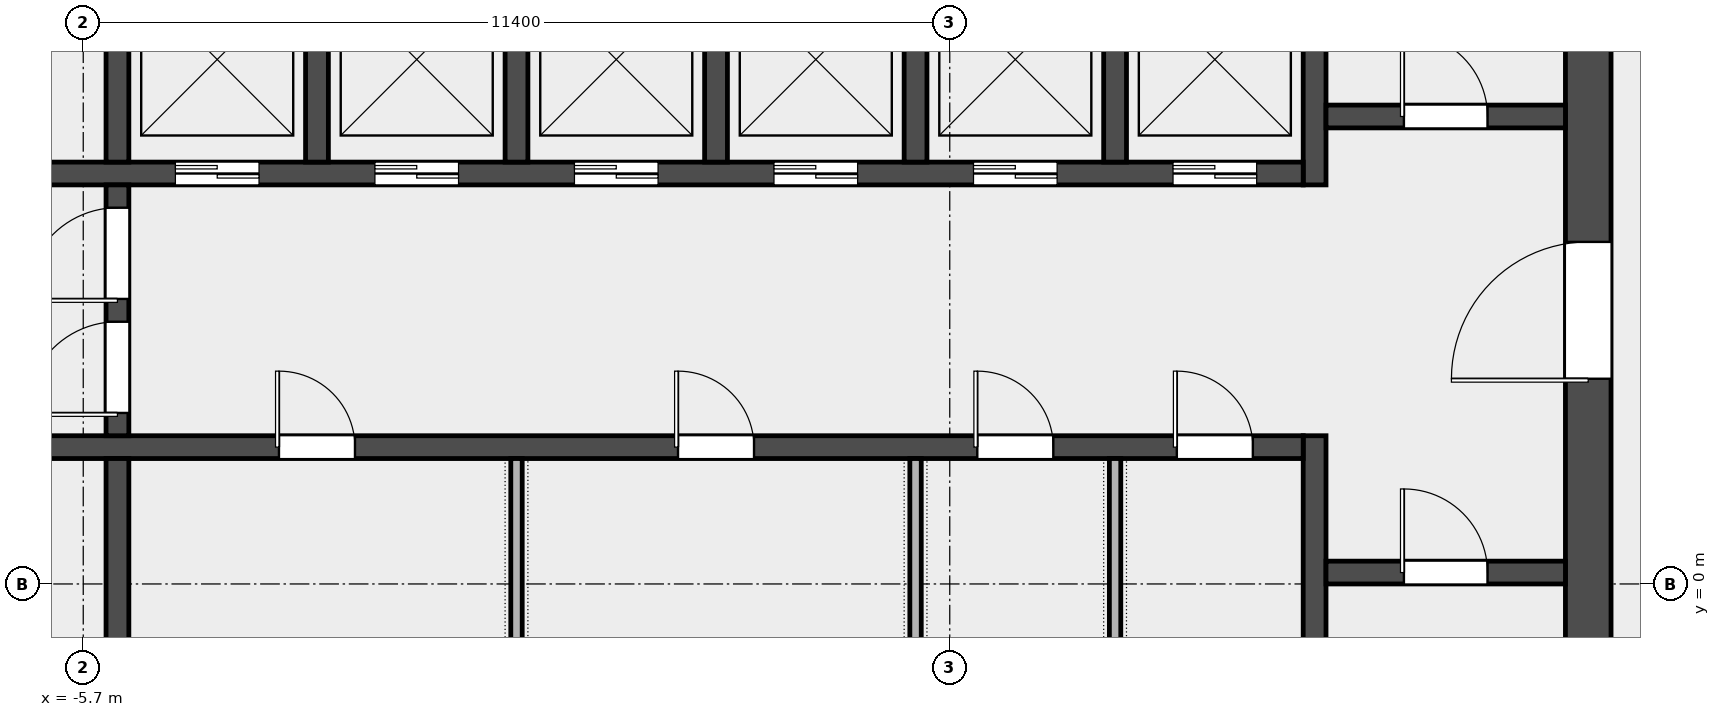
"""IFC4 building model, lengths in metres.
Left out: names, types, materials, properties, quantities, classifications, styles, units other than length and angle.
Written with IfcOpenShell. Run it as: python <this file> out.ifc"""

import sys

from ifc_helpers import new_model, si_unit, direction, frame, frame_2d, origin, place, context, subcontext, project, spatial, rectangle, extrude, element, fill, save


model = new_model("IFC4")
c1 = context("Model", 3, precision=1e-05, world=origin(), true_north=direction((0.0, 1.0)))
c2 = subcontext(c1, "Body", "Model", "MODEL_VIEW")
j1 = project(units=[si_unit("LENGTHUNIT", "METRE"), si_unit("PLANEANGLEUNIT", "RADIAN")], contexts=[c1])
p1 = place(None, origin())
s1 = spatial("IfcSite", under=j1, at=p1, CompositionType="ELEMENT")
p2 = place(p1, origin())
s2 = spatial("IfcBuilding", under=s1, at=p2, CompositionType="ELEMENT")
p3 = place(p2, frame((0.0, 0.0, 215.0)))
s3 = spatial("IfcBuildingStorey", under=s2, at=p3, CompositionType="ELEMENT", Elevation=215.0)
p4 = place(p3, frame((14.1, -6.6, 0.0), z_axis=(0.0, 0.0, 1.0), x_axis=(0.0, 1.0, 0.0)))
e1 = element("IfcWall", 1, at=p4, inside=s3, PredefinedType="SHEAR", context=c2, shape_type="SweptSolid", body=[
    extrude(rectangle(XDim=19.5, YDim=0.6, at=frame_2d((9.75, 0.0))), origin(), (0.0, 0.0, 1.0), 3.7),
])
p5 = place(p4, frame((9.3, 0.0, 0.0)))
e2 = element("IfcOpeningElement", 2, at=p5, cuts=e1, PredefinedType="OPENING", context=c2, shape_type="SweptSolid", body=[
    extrude(rectangle(XDim=1.8, YDim=2.1, at=frame_2d((0.9, 1.05))), frame((0.0, 0.312, 0.0), z_axis=(0.0, -1.0, 0.0), x_axis=(1.0, 0.0, 0.0)), (0.0, 0.0, 1.0), 0.624),
])
p6 = place(p3, frame((10.5, -6.6, 0.0), z_axis=(0.0, 0.0, 1.0), x_axis=(0.0, 1.0, 0.0)))
e3 = element("IfcWall", 3, at=p6, inside=s3, PredefinedType="SHEAR", context=c2, shape_type="SweptSolid", body=[
    extrude(rectangle(XDim=8.55, YDim=0.3, at=frame_2d((4.275, 0.0))), origin(), (0.0, 0.0, 1.0), 3.7),
])
p7 = place(p3, frame((10.5, 5.25, 0.0), z_axis=(0.0, 0.0, 1.0), x_axis=(0.0, 1.0, 0.0)))
e4 = element("IfcWall", 4, at=p7, inside=s3, PredefinedType="SHEAR", context=c2, shape_type="SweptSolid", body=[
    extrude(rectangle(XDim=7.65, YDim=0.3, at=frame_2d((3.825, 0.0))), origin(), (0.0, 0.0, 1.0), 3.7),
])
p8 = place(p3, frame((10.65, 0.15, 0.0), z_axis=(0.0, 0.0, 1.0), x_axis=(1.0, 0.0, 0.0)))
e5 = element("IfcWall", 5, at=p8, inside=s3, PredefinedType="SOLIDWALL", context=c2, shape_type="SweptSolid", body=[
    extrude(rectangle(XDim=3.15, YDim=0.3, at=frame_2d((1.575, 0.0))), origin(), (0.0, 0.0, 1.0), 3.7),
])
p9 = place(p8, frame((1.025, 0.0, 0.0)))
e6 = element("IfcOpeningElement", 6, at=p9, cuts=e5, PredefinedType="OPENING", context=c2, shape_type="SweptSolid", body=[
    extrude(rectangle(XDim=1.1, YDim=2.1, at=frame_2d((0.55, 1.05))), frame((0.0, 0.162, 0.0), z_axis=(0.0, -1.0, 0.0), x_axis=(1.0, 0.0, 0.0)), (0.0, 0.0, 1.0), 0.324),
])
p10 = place(p3, frame((10.65, 6.15, 0.0), z_axis=(0.0, 0.0, 1.0), x_axis=(1.0, 0.0, 0.0)))
e7 = element("IfcWall", 7, at=p10, inside=s3, PredefinedType="SOLIDWALL", context=c2, shape_type="SweptSolid", body=[
    extrude(rectangle(XDim=3.15, YDim=0.3, at=frame_2d((1.575, 0.0))), origin(), (0.0, 0.0, 1.0), 3.7),
])
p11 = place(p10, frame((1.025, 0.0, 0.0)))
e8 = element("IfcOpeningElement", 8, at=p11, cuts=e7, PredefinedType="OPENING", context=c2, shape_type="SweptSolid", body=[
    extrude(rectangle(XDim=1.1, YDim=2.1, at=frame_2d((0.55, 1.05))), frame((0.0, 0.162, 0.0), z_axis=(0.0, -1.0, 0.0), x_axis=(1.0, 0.0, 0.0)), (0.0, 0.0, 1.0), 0.324),
])
p12 = place(p3, frame((-10.35, 1.8, 0.0), z_axis=(0.0, 0.0, 1.0), x_axis=(1.0, 0.0, 0.0)))
e9 = element("IfcWall", 9, at=p12, inside=s3, PredefinedType="SOLIDWALL", context=c2, shape_type="SweptSolid", body=[
    extrude(rectangle(XDim=20.7, YDim=0.3, at=frame_2d((10.35, 0.0))), origin(), (0.0, 0.0, 1.0), 3.7),
])
p13 = place(p12, frame((0.512, 0.0, 0.0)))
e10 = element("IfcOpeningElement", 10, at=p13, cuts=e9, PredefinedType="OPENING", context=c2, shape_type="SweptSolid", body=[
    extrude(rectangle(XDim=1.3, YDim=2.1, at=frame_2d((0.65, 1.05))), frame((0.0, 0.162, 0.0), z_axis=(0.0, -1.0, 0.0), x_axis=(1.0, 0.0, 0.0)), (0.0, 0.0, 1.0), 0.324),
])
p14 = place(p12, frame((7.225, 0.0, 0.0)))
e11 = element("IfcOpeningElement", 11, at=p14, cuts=e9, PredefinedType="OPENING", context=c2, shape_type="SweptSolid", body=[
    extrude(rectangle(XDim=1.0, YDim=2.1, at=frame_2d((0.5, 1.05))), frame((0.0, 0.162, 0.0), z_axis=(0.0, -1.0, 0.0), x_axis=(1.0, 0.0, 0.0)), (0.0, 0.0, 1.0), 0.324),
])
p15 = place(p12, frame((12.475, 0.0, 0.0)))
e12 = element("IfcOpeningElement", 12, at=p15, cuts=e9, PredefinedType="OPENING", context=c2, shape_type="SweptSolid", body=[
    extrude(rectangle(XDim=1.0, YDim=2.1, at=frame_2d((0.5, 1.05))), frame((0.0, 0.162, 0.0), z_axis=(0.0, -1.0, 0.0), x_axis=(1.0, 0.0, 0.0)), (0.0, 0.0, 1.0), 0.324),
])
p16 = place(p12, frame((16.413, 0.0, 0.0)))
e13 = element("IfcOpeningElement", 13, at=p16, cuts=e9, PredefinedType="OPENING", context=c2, shape_type="SweptSolid", body=[
    extrude(rectangle(XDim=1.0, YDim=2.1, at=frame_2d((0.5, 1.05))), frame((0.0, 0.162, 0.0), z_axis=(0.0, -1.0, 0.0), x_axis=(1.0, 0.0, 0.0)), (0.0, 0.0, 1.0), 0.324),
])
p17 = place(p12, frame((19.038, 0.0, 0.0)))
e14 = element("IfcOpeningElement", 14, at=p17, cuts=e9, PredefinedType="OPENING", context=c2, shape_type="SweptSolid", body=[
    extrude(rectangle(XDim=1.0, YDim=2.1, at=frame_2d((0.5, 1.05))), frame((0.0, 0.162, 0.0), z_axis=(0.0, -1.0, 0.0), x_axis=(1.0, 0.0, 0.0)), (0.0, 0.0, 1.0), 0.324),
])
p18 = place(p3, frame((-10.35, 5.4, 0.0), z_axis=(0.0, 0.0, 1.0), x_axis=(1.0, 0.0, 0.0)))
e15 = element("IfcWall", 15, at=p18, inside=s3, PredefinedType="SOLIDWALL", context=c2, shape_type="SweptSolid", body=[
    extrude(rectangle(XDim=20.7, YDim=0.3, at=frame_2d((10.35, 0.0))), origin(), (0.0, 0.0, 1.0), 3.7),
])
p19 = place(p18, frame((0.512, 0.0, 0.0)))
e16 = element("IfcOpeningElement", 16, at=p19, cuts=e15, PredefinedType="OPENING", context=c2, shape_type="SweptSolid", body=[
    extrude(rectangle(XDim=1.3, YDim=2.1, at=frame_2d((0.65, 1.05))), frame((0.0, 0.162, 0.0), z_axis=(0.0, -1.0, 0.0), x_axis=(1.0, 0.0, 0.0)), (0.0, 0.0, 1.0), 0.324),
])
p20 = place(p18, frame((5.863, 0.0, 0.0)))
e17 = element("IfcOpeningElement", 17, at=p20, cuts=e15, PredefinedType="OPENING", context=c2, shape_type="SweptSolid", body=[
    extrude(rectangle(XDim=1.1, YDim=2.1, at=frame_2d((0.55, 1.05))), frame((0.0, 0.162, 0.0), z_axis=(0.0, -1.0, 0.0), x_axis=(1.0, 0.0, 0.0)), (0.0, 0.0, 1.0), 0.324),
])
p21 = place(p18, frame((8.488, 0.0, 0.0)))
e18 = element("IfcOpeningElement", 18, at=p21, cuts=e15, PredefinedType="OPENING", context=c2, shape_type="SweptSolid", body=[
    extrude(rectangle(XDim=1.1, YDim=2.1, at=frame_2d((0.55, 1.05))), frame((0.0, 0.162, 0.0), z_axis=(0.0, -1.0, 0.0), x_axis=(1.0, 0.0, 0.0)), (0.0, 0.0, 1.0), 0.324),
])
p22 = place(p18, frame((11.113, 0.0, 0.0)))
e19 = element("IfcOpeningElement", 19, at=p22, cuts=e15, PredefinedType="OPENING", context=c2, shape_type="SweptSolid", body=[
    extrude(rectangle(XDim=1.1, YDim=2.1, at=frame_2d((0.55, 1.05))), frame((0.0, 0.162, 0.0), z_axis=(0.0, -1.0, 0.0), x_axis=(1.0, 0.0, 0.0)), (0.0, 0.0, 1.0), 0.324),
])
p23 = place(p18, frame((13.738, 0.0, 0.0)))
e20 = element("IfcOpeningElement", 20, at=p23, cuts=e15, PredefinedType="OPENING", context=c2, shape_type="SweptSolid", body=[
    extrude(rectangle(XDim=1.1, YDim=2.1, at=frame_2d((0.55, 1.05))), frame((0.0, 0.162, 0.0), z_axis=(0.0, -1.0, 0.0), x_axis=(1.0, 0.0, 0.0)), (0.0, 0.0, 1.0), 0.324),
])
p24 = place(p18, frame((16.363, 0.0, 0.0)))
e21 = element("IfcOpeningElement", 21, at=p24, cuts=e15, PredefinedType="OPENING", context=c2, shape_type="SweptSolid", body=[
    extrude(rectangle(XDim=1.1, YDim=2.1, at=frame_2d((0.55, 1.05))), frame((0.0, 0.162, 0.0), z_axis=(0.0, -1.0, 0.0), x_axis=(1.0, 0.0, 0.0)), (0.0, 0.0, 1.0), 0.324),
])
p25 = place(p18, frame((18.988, 0.0, 0.0)))
e22 = element("IfcOpeningElement", 22, at=p25, cuts=e15, PredefinedType="OPENING", context=c2, shape_type="SweptSolid", body=[
    extrude(rectangle(XDim=1.1, YDim=2.1, at=frame_2d((0.55, 1.05))), frame((0.0, 0.162, 0.0), z_axis=(0.0, -1.0, 0.0), x_axis=(1.0, 0.0, 0.0)), (0.0, 0.0, 1.0), 0.324),
])
for number, where, z_axis, x_axis in (
    (23, (-5.25, -1.05, 0.0), (0.0, 0.0, 1.0), (0.0, 1.0, 0.0)),
    (24, (-5.25, 5.55, 0.0), (0.0, 0.0, 1.0), (0.0, 1.0, 0.0)),
    (25, (-2.625, 5.55, 0.0), (0.0, 0.0, 1.0), (0.0, 1.0, 0.0)),
    (26, (0.0, 5.55, 0.0), (0.0, 0.0, 1.0), (0.0, 1.0, 0.0)),
    (27, (2.625, 5.55, 0.0), (0.0, 0.0, 1.0), (0.0, 1.0, 0.0)),
    (28, (5.25, 5.55, 0.0), (0.0, 0.0, 1.0), (0.0, 1.0, 0.0)),
    (29, (7.875, 5.55, 0.0), (0.0, 0.0, 1.0), (0.0, 1.0, 0.0)),
):
    element("IfcWall", number, at=place(p3, frame(where, z_axis=z_axis, x_axis=x_axis)), inside=s3, PredefinedType="SOLIDWALL", context=c2, shape_type="SweptSolid", body=[
        extrude(rectangle(XDim=2.7, YDim=0.3, at=frame_2d((1.35, 0.0))), origin(), (0.0, 0.0, 1.0), 3.7),
    ])
p26 = place(p3, frame((-5.25, 1.95, 0.0), z_axis=(0.0, 0.0, 1.0), x_axis=(0.0, 1.0, 0.0)))
e30 = element("IfcWall", 30, at=p26, inside=s3, PredefinedType="SOLIDWALL", context=c2, shape_type="SweptSolid", body=[
    extrude(rectangle(XDim=3.3, YDim=0.3, at=frame_2d((1.65, 0.0))), origin(), (0.0, 0.0, 1.0), 3.7),
])
p27 = place(p26, frame((0.3, 0.0, 0.0)))
e31 = element("IfcOpeningElement", 31, at=p27, cuts=e30, PredefinedType="OPENING", context=c2, shape_type="SweptSolid", body=[
    extrude(rectangle(XDim=1.2, YDim=2.1, at=frame_2d((0.6, 1.05))), frame((0.0, 0.162, 0.0), z_axis=(0.0, -1.0, 0.0), x_axis=(1.0, 0.0, 0.0)), (0.0, 0.0, 1.0), 0.324),
])
p28 = place(p26, frame((1.8, 0.0, 0.0)))
e32 = element("IfcOpeningElement", 32, at=p28, cuts=e30, PredefinedType="OPENING", context=c2, shape_type="SweptSolid", body=[
    extrude(rectangle(XDim=1.2, YDim=2.1, at=frame_2d((0.6, 1.05))), frame((0.0, 0.162, 0.0), z_axis=(0.0, -1.0, 0.0), x_axis=(1.0, 0.0, 0.0)), (0.0, 0.0, 1.0), 0.324),
])
for number, where, z_axis, x_axis in (
    (33, (0.0, -1.05, 0.0), (0.0, 0.0, 1.0), (0.0, 1.0, 0.0)),
    (34, (5.25, -1.05, 0.0), (0.0, 0.0, 1.0), (0.0, 1.0, 0.0)),
    (35, (7.875, -1.05, 0.0), (0.0, 0.0, 1.0), (0.0, 1.0, 0.0)),
):
    element("IfcWall", number, at=place(p3, frame(where, z_axis=z_axis, x_axis=x_axis)), inside=s3, PredefinedType="PARTITIONING", context=c2, shape_type="SweptSolid", body=[
        extrude(rectangle(XDim=2.7, YDim=0.15, at=frame_2d((1.35, 0.0))), origin(), (0.0, 0.0, 1.0), 3.7),
    ])
p29 = place(p9, origin())
e36 = element("IfcDoor", 36, at=p29, inside=s3, OperationType="SINGLE_SWING_RIGHT", PredefinedType="DOOR", context=c2, shape_type="SweptSolid", body=[
    extrude(rectangle(XDim=1.1, YDim=2.1, at=frame_2d((0.55, 1.05))), frame((0.0, 0.025, 0.0), z_axis=(0.0, -1.0, 0.0), x_axis=(1.0, 0.0, 0.0)), (0.0, 0.0, 1.0), 0.05),
])
fill(e6, e36)
p30 = place(p11, origin())
e37 = element("IfcDoor", 37, at=p30, inside=s3, OperationType="SINGLE_SWING_RIGHT", PredefinedType="DOOR", context=c2, shape_type="SweptSolid", body=[
    extrude(rectangle(XDim=1.1, YDim=2.1, at=frame_2d((0.55, 1.05))), frame((0.0, 0.025, 0.0), z_axis=(0.0, -1.0, 0.0), x_axis=(1.0, 0.0, 0.0)), (0.0, 0.0, 1.0), 0.05),
])
fill(e8, e37)
p31 = place(p5, origin())
e38 = element("IfcDoor", 38, at=p31, inside=s3, OperationType="DOUBLE_DOOR_SINGLE_SWING", PredefinedType="DOOR", context=c2, shape_type="SweptSolid", body=[
    extrude(rectangle(XDim=1.8, YDim=2.1, at=frame_2d((0.9, 1.05))), frame((0.0, 0.025, 0.0), z_axis=(0.0, -1.0, 0.0), x_axis=(1.0, 0.0, 0.0)), (0.0, 0.0, 1.0), 0.05),
])
fill(e2, e38)
p32 = place(p27, origin())
e39 = element("IfcDoor", 39, at=p32, inside=s3, OperationType="SINGLE_SWING_LEFT", PredefinedType="DOOR", context=c2, shape_type="SweptSolid", body=[
    extrude(rectangle(XDim=1.2, YDim=2.1, at=frame_2d((0.6, 1.05))), frame((0.0, 0.025, 0.0), z_axis=(0.0, -1.0, 0.0), x_axis=(1.0, 0.0, 0.0)), (0.0, 0.0, 1.0), 0.05),
])
fill(e31, e39)
p33 = place(p28, origin())
e40 = element("IfcDoor", 40, at=p33, inside=s3, OperationType="SINGLE_SWING_RIGHT", PredefinedType="DOOR", context=c2, shape_type="SweptSolid", body=[
    extrude(rectangle(XDim=1.2, YDim=2.1, at=frame_2d((0.6, 1.05))), frame((0.0, 0.025, 0.0), z_axis=(0.0, -1.0, 0.0), x_axis=(1.0, 0.0, 0.0)), (0.0, 0.0, 1.0), 0.05),
])
fill(e32, e40)
p34 = place(p20, origin())
e41 = element("IfcDoor", 41, at=p34, inside=s3, OperationType="DOUBLE_DOOR_SLIDING", PredefinedType="DOOR", context=c2, shape_type="SweptSolid", body=[
    extrude(rectangle(XDim=1.1, YDim=2.1, at=frame_2d((0.55, 1.05))), frame((0.0, 0.025, 0.0), z_axis=(0.0, -1.0, 0.0), x_axis=(1.0, 0.0, 0.0)), (0.0, 0.0, 1.0), 0.05),
])
fill(e17, e41)
p35 = place(p21, origin())
e42 = element("IfcDoor", 42, at=p35, inside=s3, OperationType="DOUBLE_DOOR_SLIDING", PredefinedType="DOOR", context=c2, shape_type="SweptSolid", body=[
    extrude(rectangle(XDim=1.1, YDim=2.1, at=frame_2d((0.55, 1.05))), frame((0.0, 0.025, 0.0), z_axis=(0.0, -1.0, 0.0), x_axis=(1.0, 0.0, 0.0)), (0.0, 0.0, 1.0), 0.05),
])
fill(e18, e42)
p36 = place(p22, origin())
e43 = element("IfcDoor", 43, at=p36, inside=s3, OperationType="DOUBLE_DOOR_SLIDING", PredefinedType="DOOR", context=c2, shape_type="SweptSolid", body=[
    extrude(rectangle(XDim=1.1, YDim=2.1, at=frame_2d((0.55, 1.05))), frame((0.0, 0.025, 0.0), z_axis=(0.0, -1.0, 0.0), x_axis=(1.0, 0.0, 0.0)), (0.0, 0.0, 1.0), 0.05),
])
fill(e19, e43)
p37 = place(p23, origin())
e44 = element("IfcDoor", 44, at=p37, inside=s3, OperationType="DOUBLE_DOOR_SLIDING", PredefinedType="DOOR", context=c2, shape_type="SweptSolid", body=[
    extrude(rectangle(XDim=1.1, YDim=2.1, at=frame_2d((0.55, 1.05))), frame((0.0, 0.025, 0.0), z_axis=(0.0, -1.0, 0.0), x_axis=(1.0, 0.0, 0.0)), (0.0, 0.0, 1.0), 0.05),
])
fill(e20, e44)
p38 = place(p24, origin())
e45 = element("IfcDoor", 45, at=p38, inside=s3, OperationType="DOUBLE_DOOR_SLIDING", PredefinedType="DOOR", context=c2, shape_type="SweptSolid", body=[
    extrude(rectangle(XDim=1.1, YDim=2.1, at=frame_2d((0.55, 1.05))), frame((0.0, 0.025, 0.0), z_axis=(0.0, -1.0, 0.0), x_axis=(1.0, 0.0, 0.0)), (0.0, 0.0, 1.0), 0.05),
])
fill(e21, e45)
p39 = place(p25, origin())
e46 = element("IfcDoor", 46, at=p39, inside=s3, OperationType="DOUBLE_DOOR_SLIDING", PredefinedType="DOOR", context=c2, shape_type="SweptSolid", body=[
    extrude(rectangle(XDim=1.1, YDim=2.1, at=frame_2d((0.55, 1.05))), frame((0.0, 0.025, 0.0), z_axis=(0.0, -1.0, 0.0), x_axis=(1.0, 0.0, 0.0)), (0.0, 0.0, 1.0), 0.05),
])
fill(e22, e46)
p40 = place(p14, origin())
e47 = element("IfcDoor", 47, at=p40, inside=s3, OperationType="SINGLE_SWING_LEFT", PredefinedType="DOOR", context=c2, shape_type="SweptSolid", body=[
    extrude(rectangle(XDim=1.0, YDim=2.1, at=frame_2d((0.5, 1.05))), frame((0.0, 0.025, 0.0), z_axis=(0.0, -1.0, 0.0), x_axis=(1.0, 0.0, 0.0)), (0.0, 0.0, 1.0), 0.05),
])
fill(e11, e47)
p41 = place(p15, origin())
e48 = element("IfcDoor", 48, at=p41, inside=s3, OperationType="SINGLE_SWING_LEFT", PredefinedType="DOOR", context=c2, shape_type="SweptSolid", body=[
    extrude(rectangle(XDim=1.0, YDim=2.1, at=frame_2d((0.5, 1.05))), frame((0.0, 0.025, 0.0), z_axis=(0.0, -1.0, 0.0), x_axis=(1.0, 0.0, 0.0)), (0.0, 0.0, 1.0), 0.05),
])
fill(e12, e48)
p42 = place(p16, origin())
e49 = element("IfcDoor", 49, at=p42, inside=s3, OperationType="SINGLE_SWING_LEFT", PredefinedType="DOOR", context=c2, shape_type="SweptSolid", body=[
    extrude(rectangle(XDim=1.0, YDim=2.1, at=frame_2d((0.5, 1.05))), frame((0.0, 0.025, 0.0), z_axis=(0.0, -1.0, 0.0), x_axis=(1.0, 0.0, 0.0)), (0.0, 0.0, 1.0), 0.05),
])
fill(e13, e49)
p43 = place(p17, origin())
e50 = element("IfcDoor", 50, at=p43, inside=s3, OperationType="SINGLE_SWING_LEFT", PredefinedType="DOOR", context=c2, shape_type="SweptSolid", body=[
    extrude(rectangle(XDim=1.0, YDim=2.1, at=frame_2d((0.5, 1.05))), frame((0.0, 0.025, 0.0), z_axis=(0.0, -1.0, 0.0), x_axis=(1.0, 0.0, 0.0)), (0.0, 0.0, 1.0), 0.05),
])
fill(e14, e50)
save(model, sys.argv[1])
